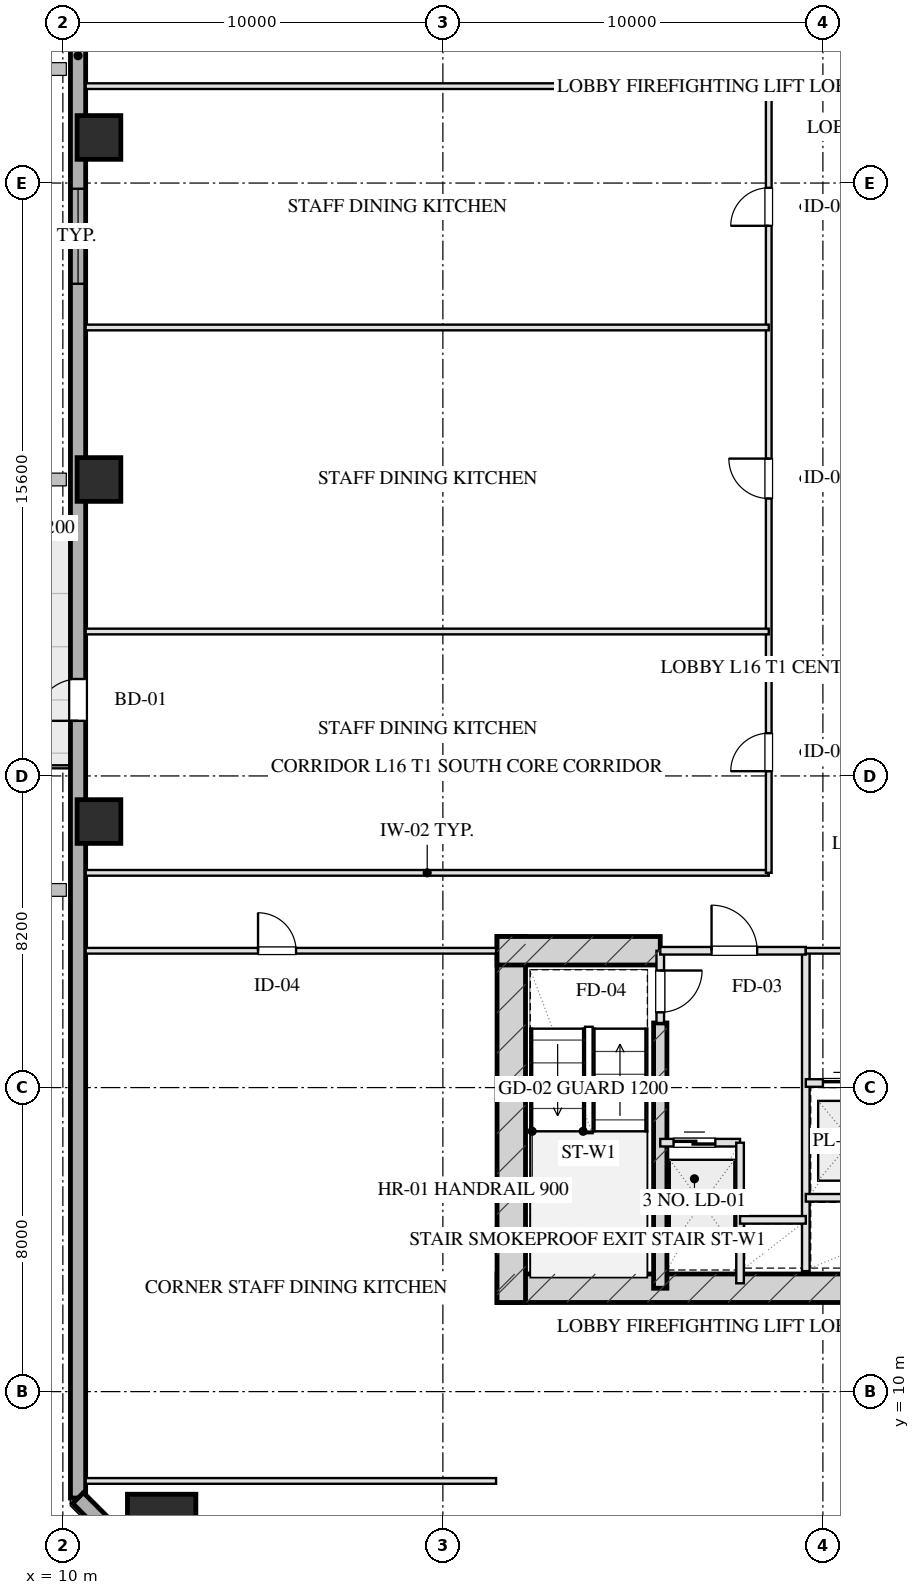
"""IFC4 building model, lengths in metres.
Left out: names, types, materials, properties, quantities, classifications, styles, units other than length and angle.
Written with IfcOpenShell. Run it as: python <this file> out.ifc"""

import sys

from ifc_helpers import new_model, si_unit, direction, frame, frame_2d, origin, origin_2d, place, context, subcontext, project, spatial, rectangle, hollow_rectangle, extrude, element, fill, save


model = new_model("IFC4")
c1 = context("Model", 3, precision=1e-05, world=origin(), true_north=direction((0.0, 1.0)))
c2 = subcontext(c1, "Body", "Model", "MODEL_VIEW")
j1 = project(units=[si_unit("LENGTHUNIT", "METRE"), si_unit("PLANEANGLEUNIT", "RADIAN")], contexts=[c1])
p1 = place(None, origin())
s1 = spatial("IfcSite", under=j1, at=p1, CompositionType="ELEMENT")
p2 = place(p1, origin())
s2 = spatial("IfcBuilding", under=s1, at=p2, CompositionType="ELEMENT")
p3 = place(p2, frame((0.0, 0.0, 67.85)))
s3 = spatial("IfcBuildingStorey", under=s2, at=p3, CompositionType="ELEMENT", Elevation=67.85)
p4 = place(p3, frame((21.425, 12.72, 0.0), z_axis=(0.0, 0.0, 1.0), x_axis=(1.0, 0.0, 0.0)))
e1 = element("IfcWall", 1, at=p4, inside=s3, PredefinedType="SHEAR", context=c2, shape_type="SweptSolid", body=[
    extrude(rectangle(XDim=17.15, YDim=0.75, at=frame_2d((8.575, 0.0))), origin(), (0.0, 0.0, 1.0), 3.45),
])
p5 = place(p3, frame((21.8, 21.975, 0.0), z_axis=(0.0, 0.0, 1.0), x_axis=(0.0, -1.0, 0.0)))
e2 = element("IfcWall", 2, at=p5, inside=s3, PredefinedType="SHEAR", context=c2, shape_type="SweptSolid", body=[
    extrude(rectangle(XDim=9.63, YDim=0.75, at=frame_2d((4.815, 0.0))), origin(), (0.0, 0.0, 1.0), 3.45),
])
p6 = place(p3, frame((25.72, 19.7, 0.0), z_axis=(0.0, 0.0, 1.0), x_axis=(0.0, -1.0, 0.0)))
e3 = element("IfcWall", 3, at=p6, inside=s3, PredefinedType="SHEAR", context=c2, shape_type="SweptSolid", body=[
    extrude(rectangle(XDim=6.98, YDim=0.35, at=frame_2d((3.49, 0.0))), origin(), (0.0, 0.0, 1.0), 3.45),
])
p7 = place(p3, frame((21.425, 21.6, 0.0), z_axis=(0.0, 0.0, 1.0), x_axis=(1.0, 0.0, 0.0)))
e4 = element("IfcWall", 4, at=p7, inside=s3, PredefinedType="SHEAR", context=c2, shape_type="SweptSolid", body=[
    extrude(rectangle(XDim=4.295, YDim=0.75, at=frame_2d((2.147, 0.0))), origin(), (0.0, 0.0, 1.0), 3.45),
])
p8 = place(p3, frame((12.6, 6.4, 0.0), z_axis=(0.0, 0.0, 1.0), x_axis=(1.0, 0.0, 0.0)))
e5 = element("IfcColumn", 5, at=p8, inside=s3, PredefinedType="COLUMN", context=c2, shape_type="SweptSolid", body=[
    extrude(hollow_rectangle(XDim=1.8, YDim=1.8, WallThickness=0.06, at=origin_2d()), origin(), (0.0, 0.0, 1.0), 3.451),
])
for number, where, z_axis, x_axis in (
    (6, (10.95, 25.0, 0.0), (0.0, 0.0, 1.0), (1.0, 0.0, 0.0)),
    (7, (10.95, 34.0, 0.0), (0.0, 0.0, 1.0), (1.0, 0.0, 0.0)),
    (8, (10.95, 43.0, 0.0), (0.0, 0.0, 1.0), (1.0, 0.0, 0.0)),
):
    element("IfcColumn", number, at=place(p3, frame(where, z_axis=z_axis, x_axis=x_axis)), inside=s3, PredefinedType="COLUMN", context=c2, shape_type="SweptSolid", body=[
        extrude(hollow_rectangle(XDim=1.15, YDim=1.15, WallThickness=0.04, at=origin_2d()), origin(), (0.0, 0.0, 1.0), 3.451),
    ])
p9 = place(p3, frame((10.4, 7.2, 0.0), z_axis=(0.0, 0.0, 1.0), x_axis=(0.0, 1.0, 0.0)))
e9 = element("IfcWall", 9, at=p9, inside=s3, PredefinedType="SOLIDWALL", context=c2, shape_type="SweptSolid", body=[
    extrude(rectangle(XDim=53.6, YDim=0.4, at=frame_2d((26.8, 0.0))), origin(), (0.0, 0.0, 1.0), 2.61),
])
p10 = place(p9, frame((31.95, 0.0, 0.75)))
e10 = element("IfcOpeningElement", 10, at=p10, cuts=e9, PredefinedType="OPENING", context=c2, shape_type="SweptSolid", body=[
    extrude(rectangle(XDim=2.5, YDim=1.46, at=frame_2d((1.25, 0.73))), frame((0.0, 0.21, 0.0), z_axis=(0.0, -1.0, 0.0), x_axis=(1.0, 0.0, 0.0)), (0.0, 0.0, 1.0), 0.42),
])
p11 = place(p9, frame((20.45, 0.0, 0.0)))
e11 = element("IfcOpeningElement", 11, at=p11, cuts=e9, PredefinedType="OPENING", context=c2, shape_type="SweptSolid", body=[
    extrude(rectangle(XDim=1.1, YDim=2.15, at=frame_2d((0.55, 1.075))), frame((0.0, 0.21, 0.0), z_axis=(0.0, -1.0, 0.0), x_axis=(1.0, 0.0, 0.0)), (0.0, 0.0, 1.0), 0.42),
])
p12 = place(p3, frame((13.4, 4.2, 0.0), z_axis=(0.0, 0.0, 1.0), x_axis=(-0.707106781187, 0.707106781187, 0.0)))
e12 = element("IfcWall", 12, at=p12, inside=s3, PredefinedType="SOLIDWALL", context=c2, shape_type="SweptSolid", body=[
    extrude(rectangle(XDim=4.243, YDim=0.4, at=frame_2d((2.121, 0.0))), origin(), (0.0, 0.0, 1.0), 2.61),
])
p13 = place(p3, frame((25.72, 21.6, 0.0), z_axis=(0.0, 0.0, 1.0), x_axis=(0.0, -1.0, 0.0)))
e13 = element("IfcWall", 13, at=p13, inside=s3, PredefinedType="PARTITIONING", context=c2, shape_type="SweptSolid", body=[
    extrude(rectangle(XDim=1.9, YDim=0.2, at=frame_2d((0.95, 0.0))), origin(), (0.0, 0.0, 1.0), 3.175),
])
p14 = place(p13, frame((0.52, 0.0, 0.0)))
e14 = element("IfcOpeningElement", 14, at=p14, cuts=e13, PredefinedType="OPENING", context=c2, shape_type="SweptSolid", body=[
    extrude(rectangle(XDim=1.1, YDim=2.05, at=frame_2d((0.55, 1.025))), frame((0.0, 0.11, 0.0), z_axis=(0.0, -1.0, 0.0), x_axis=(1.0, 0.0, 0.0)), (0.0, 0.0, 1.0), 0.22),
])
p15 = place(p3, frame((29.55, 21.6, 0.0), z_axis=(0.0, 0.0, 1.0), x_axis=(0.0, -1.0, 0.0)))
e15 = element("IfcWall", 15, at=p15, inside=s3, PredefinedType="PARTITIONING", context=c2, shape_type="SweptSolid", body=[
    extrude(rectangle(XDim=8.43, YDim=0.2, at=frame_2d((4.215, 0.0))), origin(), (0.0, 0.0, 1.0), 3.175),
])
p16 = place(p3, frame((25.72, 21.6, 0.0), z_axis=(0.0, 0.0, 1.0), x_axis=(1.0, 0.0, 0.0)))
e16 = element("IfcWall", 16, at=p16, inside=s3, PredefinedType="PARTITIONING", context=c2, shape_type="SweptSolid", body=[
    extrude(rectangle(XDim=3.83, YDim=0.2, at=frame_2d((1.915, 0.0))), origin(), (0.0, 0.0, 1.0), 3.175),
])
p17 = place(p16, frame((1.35, 0.0, 0.0)))
e17 = element("IfcOpeningElement", 17, at=p17, cuts=e16, PredefinedType="OPENING", context=c2, shape_type="SweptSolid", body=[
    extrude(rectangle(XDim=1.2, YDim=2.05, at=frame_2d((0.6, 1.025))), frame((0.0, 0.11, 0.0), z_axis=(0.0, -1.0, 0.0), x_axis=(1.0, 0.0, 0.0)), (0.0, 0.0, 1.0), 0.22),
])
p18 = place(p3, frame((25.72, 16.55, 0.0), z_axis=(0.0, 0.0, 1.0), x_axis=(1.0, 0.0, 0.0)))
e18 = element("IfcWall", 18, at=p18, inside=s3, PredefinedType="PARTITIONING", context=c2, shape_type="SweptSolid", body=[
    extrude(rectangle(XDim=2.1, YDim=0.2, at=frame_2d((1.05, 0.0))), origin(), (0.0, 0.0, 1.0), 3.175),
])
p19 = place(p18, frame((0.35, 0.0, 0.0)))
e19 = element("IfcOpeningElement", 19, at=p19, cuts=e18, PredefinedType="OPENING", context=c2, shape_type="SweptSolid", body=[
    extrude(rectangle(XDim=1.1, YDim=2.05, at=frame_2d((0.55, 1.025))), frame((0.0, 0.11, 0.0), z_axis=(0.0, -1.0, 0.0), x_axis=(1.0, 0.0, 0.0)), (0.0, 0.0, 1.0), 0.22),
])
p20 = place(p3, frame((27.82, 16.55, 0.0), z_axis=(0.0, 0.0, 1.0), x_axis=(0.0, -1.0, 0.0)))
e20 = element("IfcWall", 20, at=p20, inside=s3, PredefinedType="PARTITIONING", context=c2, shape_type="SweptSolid", body=[
    extrude(rectangle(XDim=3.7, YDim=0.2, at=frame_2d((1.85, 0.0))), origin(), (0.0, 0.0, 1.0), 3.175),
])
p21 = place(p3, frame((27.82, 14.52, 0.0), z_axis=(0.0, 0.0, 1.0), x_axis=(1.0, 0.0, 0.0)))
e21 = element("IfcWall", 21, at=p21, inside=s3, PredefinedType="PARTITIONING", context=c2, shape_type="SweptSolid", body=[
    extrude(rectangle(XDim=1.73, YDim=0.2, at=frame_2d((0.865, 0.0))), origin(), (0.0, 0.0, 1.0), 3.175),
])
p22 = place(p3, frame((29.55, 21.6, 0.0), z_axis=(0.0, 0.0, 1.0), x_axis=(1.0, 0.0, 0.0)))
e22 = element("IfcWall", 22, at=p22, inside=s3, PredefinedType="PARTITIONING", context=c2, shape_type="SweptSolid", body=[
    extrude(rectangle(XDim=4.4, YDim=0.15, at=frame_2d((2.2, 0.0))), origin(), (0.0, 0.0, 1.0), 3.175),
])
p23 = place(p22, frame((1.45, 0.0, 0.0)))
e23 = element("IfcOpeningElement", 23, at=p23, cuts=e22, PredefinedType="OPENING", context=c2, shape_type="SweptSolid", body=[
    extrude(rectangle(XDim=1.5, YDim=2.05, at=frame_2d((0.75, 1.025))), frame((0.0, 0.085, 0.0), z_axis=(0.0, -1.0, 0.0), x_axis=(1.0, 0.0, 0.0)), (0.0, 0.0, 1.0), 0.17),
])
p24 = place(p3, frame((29.55, 18.12, 0.0), z_axis=(0.0, 0.0, 1.0), x_axis=(1.0, 0.0, 0.0)))
e24 = element("IfcWall", 24, at=p24, inside=s3, PredefinedType="PARTITIONING", context=c2, shape_type="SweptSolid", body=[
    extrude(rectangle(XDim=4.4, YDim=0.2, at=frame_2d((2.2, 0.0))), origin(), (0.0, 0.0, 1.0), 3.175),
])
p25 = place(p24, frame((0.45, 0.0, 0.0)))
e25 = element("IfcOpeningElement", 25, at=p25, cuts=e24, PredefinedType="OPENING", context=c2, shape_type="SweptSolid", body=[
    extrude(rectangle(XDim=1.1, YDim=2.05, at=frame_2d((0.55, 1.025))), frame((0.0, 0.11, 0.0), z_axis=(0.0, -1.0, 0.0), x_axis=(1.0, 0.0, 0.0)), (0.0, 0.0, 1.0), 0.22),
])
p26 = place(p24, frame((2.55, 0.0, 0.0)))
e26 = element("IfcOpeningElement", 26, at=p26, cuts=e24, PredefinedType="OPENING", context=c2, shape_type="SweptSolid", body=[
    extrude(rectangle(XDim=1.1, YDim=2.05, at=frame_2d((0.55, 1.025))), frame((0.0, 0.11, 0.0), z_axis=(0.0, -1.0, 0.0), x_axis=(1.0, 0.0, 0.0)), (0.0, 0.0, 1.0), 0.22),
])
p27 = place(p3, frame((29.55, 15.1, 0.0), z_axis=(0.0, 0.0, 1.0), x_axis=(1.0, 0.0, 0.0)))
e27 = element("IfcWall", 27, at=p27, inside=s3, PredefinedType="PARTITIONING", context=c2, shape_type="SweptSolid", body=[
    extrude(rectangle(XDim=4.4, YDim=0.2, at=frame_2d((2.2, 0.0))), origin(), (0.0, 0.0, 1.0), 3.175),
])
p28 = place(p3, frame((10.6, 7.65, 0.0), z_axis=(0.0, 0.0, 1.0), x_axis=(1.0, 0.0, 0.0)))
e28 = element("IfcWall", 28, at=p28, inside=s3, PredefinedType="PARTITIONING", context=c2, shape_type="SweptSolid", body=[
    extrude(rectangle(XDim=10.8, YDim=0.15, at=frame_2d((5.4, 0.0))), origin(), (0.0, 0.0, 1.0), 3.175),
])
p29 = place(p3, frame((10.6, 21.6, 0.0), z_axis=(0.0, 0.0, 1.0), x_axis=(1.0, 0.0, 0.0)))
e29 = element("IfcWall", 29, at=p29, inside=s3, PredefinedType="PARTITIONING", context=c2, shape_type="SweptSolid", body=[
    extrude(rectangle(XDim=10.8, YDim=0.15, at=frame_2d((5.4, 0.0))), origin(), (0.0, 0.0, 1.0), 3.175),
])
p30 = place(p29, frame((4.536, 0.0, 0.0)))
e30 = element("IfcOpeningElement", 30, at=p30, cuts=e29, PredefinedType="OPENING", context=c2, shape_type="SweptSolid", body=[
    extrude(rectangle(XDim=1.0, YDim=2.05, at=frame_2d((0.5, 1.025))), frame((0.0, 0.085, 0.0), z_axis=(0.0, -1.0, 0.0), x_axis=(1.0, 0.0, 0.0)), (0.0, 0.0, 1.0), 0.17),
])
for number, where, z_axis, x_axis in (
    (31, (10.6, 23.65, 0.0), (0.0, 0.0, 1.0), (1.0, 0.0, 0.0)),
    (32, (10.6, 44.35, 0.0), (0.0, 0.0, 1.0), (1.0, 0.0, 0.0)),
):
    element("IfcWall", number, at=place(p3, frame(where, z_axis=z_axis, x_axis=x_axis)), inside=s3, PredefinedType="PARTITIONING", context=c2, shape_type="SweptSolid", body=[
        extrude(rectangle(XDim=17.975, YDim=0.15, at=frame_2d((8.987, 0.0))), origin(), (0.0, 0.0, 1.0), 3.175),
    ])
p31 = place(p3, frame((28.575, 23.65, 0.0), z_axis=(0.0, 0.0, 1.0), x_axis=(0.0, 1.0, 0.0)))
e33 = element("IfcWall", 33, at=p31, inside=s3, PredefinedType="PARTITIONING", context=c2, shape_type="SweptSolid", body=[
    extrude(rectangle(XDim=20.7, YDim=0.15, at=frame_2d((10.35, 0.0))), origin(), (0.0, 0.0, 1.0), 3.175),
])
p32 = place(p31, frame((2.675, 0.0, 0.0)))
e34 = element("IfcOpeningElement", 34, at=p32, cuts=e33, PredefinedType="OPENING", context=c2, shape_type="SweptSolid", body=[
    extrude(rectangle(XDim=1.0, YDim=2.05, at=frame_2d((0.5, 1.025))), frame((0.0, 0.085, 0.0), z_axis=(0.0, -1.0, 0.0), x_axis=(1.0, 0.0, 0.0)), (0.0, 0.0, 1.0), 0.17),
])
p33 = place(p31, frame((9.85, 0.0, 0.0)))
e35 = element("IfcOpeningElement", 35, at=p33, cuts=e33, PredefinedType="OPENING", context=c2, shape_type="SweptSolid", body=[
    extrude(rectangle(XDim=1.05, YDim=2.05, at=frame_2d((0.525, 1.025))), frame((0.0, 0.085, 0.0), z_axis=(0.0, -1.0, 0.0), x_axis=(1.0, 0.0, 0.0)), (0.0, 0.0, 1.0), 0.17),
])
p34 = place(p31, frame((17.025, 0.0, 0.0)))
e36 = element("IfcOpeningElement", 36, at=p34, cuts=e33, PredefinedType="OPENING", context=c2, shape_type="SweptSolid", body=[
    extrude(rectangle(XDim=1.0, YDim=2.05, at=frame_2d((0.5, 1.025))), frame((0.0, 0.085, 0.0), z_axis=(0.0, -1.0, 0.0), x_axis=(1.0, 0.0, 0.0)), (0.0, 0.0, 1.0), 0.17),
])
for number, where, z_axis, x_axis in (
    (37, (10.6, 30.0, 0.0), (0.0, 0.0, 1.0), (1.0, 0.0, 0.0)),
    (38, (10.6, 38.0, 0.0), (0.0, 0.0, 1.0), (1.0, 0.0, 0.0)),
):
    element("IfcWall", number, at=place(p3, frame(where, z_axis=z_axis, x_axis=x_axis)), inside=s3, PredefinedType="PARTITIONING", context=c2, shape_type="SweptSolid", body=[
        extrude(rectangle(XDim=17.975, YDim=0.15, at=frame_2d((8.987, 0.0))), origin(), (0.0, 0.0, 1.0), 3.175),
    ])
p35 = place(p10, origin())
e39 = element("IfcWindow", 39, at=p35, inside=s3, PartitioningType="TRIPLE_PANEL_VERTICAL", PredefinedType="WINDOW", context=c2, shape_type="SweptSolid", body=[
    extrude(rectangle(XDim=2.5, YDim=1.46, at=frame_2d((1.25, 0.73))), frame((0.0, 0.03, 0.0), z_axis=(0.0, -1.0, 0.0), x_axis=(1.0, 0.0, 0.0)), (0.0, 0.0, 1.0), 0.06),
])
fill(e10, e39)
p36 = place(p11, origin())
e40 = element("IfcDoor", 40, at=p36, inside=s3, OperationType="SINGLE_SWING_LEFT", PredefinedType="DOOR", context=c2, shape_type="SweptSolid", body=[
    extrude(rectangle(XDim=1.1, YDim=2.15, at=frame_2d((0.55, 1.075))), frame((0.0, 0.025, 0.0), z_axis=(0.0, -1.0, 0.0), x_axis=(1.0, 0.0, 0.0)), (0.0, 0.0, 1.0), 0.05),
])
fill(e11, e40)
p37 = place(p14, origin())
e41 = element("IfcDoor", 41, at=p37, inside=s3, OperationType="SINGLE_SWING_LEFT", PredefinedType="DOOR", context=c2, shape_type="SweptSolid", body=[
    extrude(rectangle(XDim=1.1, YDim=2.05, at=frame_2d((0.55, 1.025))), frame((0.0, 0.025, 0.0), z_axis=(0.0, -1.0, 0.0), x_axis=(1.0, 0.0, 0.0)), (0.0, 0.0, 1.0), 0.05),
])
fill(e14, e41)
p38 = place(p17, origin())
e42 = element("IfcDoor", 42, at=p38, inside=s3, OperationType="SINGLE_SWING_LEFT", PredefinedType="DOOR", context=c2, shape_type="SweptSolid", body=[
    extrude(rectangle(XDim=1.2, YDim=2.05, at=frame_2d((0.6, 1.025))), frame((0.0, 0.025, 0.0), z_axis=(0.0, -1.0, 0.0), x_axis=(1.0, 0.0, 0.0)), (0.0, 0.0, 1.0), 0.05),
])
fill(e17, e42)
p39 = place(p19, origin())
e43 = element("IfcDoor", 43, at=p39, inside=s3, OperationType="DOUBLE_DOOR_SLIDING", PredefinedType="DOOR", context=c2, shape_type="SweptSolid", body=[
    extrude(rectangle(XDim=1.1, YDim=2.05, at=frame_2d((0.55, 1.025))), frame((0.0, 0.025, 0.0), z_axis=(0.0, -1.0, 0.0), x_axis=(1.0, 0.0, 0.0)), (0.0, 0.0, 1.0), 0.05),
])
fill(e19, e43)
p40 = place(p25, origin())
e44 = element("IfcDoor", 44, at=p40, inside=s3, OperationType="DOUBLE_DOOR_SLIDING", PredefinedType="DOOR", context=c2, shape_type="SweptSolid", body=[
    extrude(rectangle(XDim=1.1, YDim=2.05, at=frame_2d((0.55, 1.025))), frame((0.0, 0.025, 0.0), z_axis=(0.0, -1.0, 0.0), x_axis=(1.0, 0.0, 0.0)), (0.0, 0.0, 1.0), 0.05),
])
fill(e25, e44)
p41 = place(p30, origin())
e45 = element("IfcDoor", 45, at=p41, inside=s3, OperationType="SINGLE_SWING_LEFT", PredefinedType="DOOR", context=c2, shape_type="SweptSolid", body=[
    extrude(rectangle(XDim=1.0, YDim=2.05, at=frame_2d((0.5, 1.025))), frame((0.0, 0.025, 0.0), z_axis=(0.0, -1.0, 0.0), x_axis=(1.0, 0.0, 0.0)), (0.0, 0.0, 1.0), 0.05),
])
fill(e30, e45)
p42 = place(p32, origin())
e46 = element("IfcDoor", 46, at=p42, inside=s3, OperationType="SINGLE_SWING_LEFT", PredefinedType="DOOR", context=c2, shape_type="SweptSolid", body=[
    extrude(rectangle(XDim=1.0, YDim=2.05, at=frame_2d((0.5, 1.025))), frame((0.0, 0.025, 0.0), z_axis=(0.0, -1.0, 0.0), x_axis=(1.0, 0.0, 0.0)), (0.0, 0.0, 1.0), 0.05),
])
fill(e34, e46)
p43 = place(p33, origin())
e47 = element("IfcDoor", 47, at=p43, inside=s3, OperationType="SINGLE_SWING_RIGHT", PredefinedType="DOOR", context=c2, shape_type="SweptSolid", body=[
    extrude(rectangle(XDim=1.05, YDim=2.05, at=frame_2d((0.525, 1.025))), frame((0.0, 0.025, 0.0), z_axis=(0.0, -1.0, 0.0), x_axis=(1.0, 0.0, 0.0)), (0.0, 0.0, 1.0), 0.05),
])
fill(e35, e47)
p44 = place(p34, origin())
e48 = element("IfcDoor", 48, at=p44, inside=s3, OperationType="SINGLE_SWING_LEFT", PredefinedType="DOOR", context=c2, shape_type="SweptSolid", body=[
    extrude(rectangle(XDim=1.0, YDim=2.05, at=frame_2d((0.5, 1.025))), frame((0.0, 0.025, 0.0), z_axis=(0.0, -1.0, 0.0), x_axis=(1.0, 0.0, 0.0)), (0.0, 0.0, 1.0), 0.05),
])
fill(e36, e48)
save(model, sys.argv[1])
